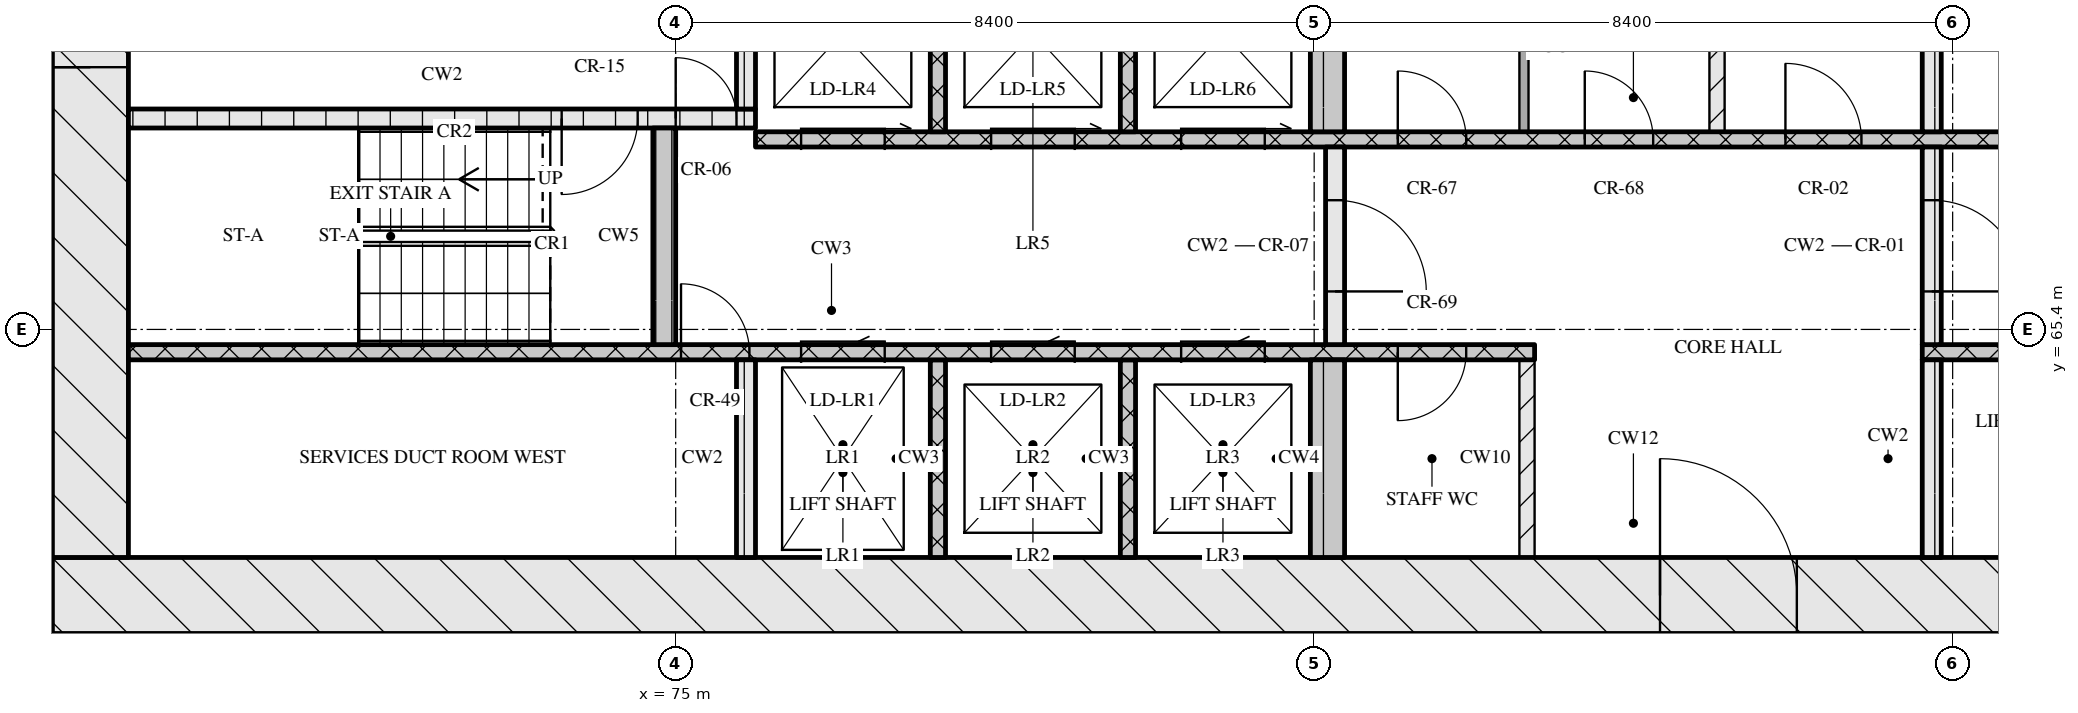
"""IFC4 building model, lengths in metres.
Left out: names, types, materials, properties, quantities, classifications, styles, units other than length and angle.
Written with IfcOpenShell. Run it as: python <this file> out.ifc"""

import sys

from ifc_helpers import new_model, si_unit, direction, frame, frame_2d, origin, place, context, subcontext, project, spatial, rectangle, extrude, element, fill, save


model = new_model("IFC4")
c1 = context("Model", 3, precision=1e-05, world=origin(), true_north=direction((0.0, 1.0)))
c2 = subcontext(c1, "Body", "Model", "MODEL_VIEW")
j1 = project(units=[si_unit("LENGTHUNIT", "METRE"), si_unit("PLANEANGLEUNIT", "RADIAN")], contexts=[c1])
p1 = place(None, origin())
s1 = spatial("IfcSite", under=j1, at=p1, CompositionType="ELEMENT")
p2 = place(p1, origin())
s2 = spatial("IfcBuilding", under=s1, at=p2, CompositionType="ELEMENT")
p3 = place(p2, frame((0.0, 0.0, 120.45)))
s3 = spatial("IfcBuildingStorey", under=s2, at=p3, CompositionType="ELEMENT", Elevation=120.45)
p4 = place(p3, frame((66.8, 61.9, 0.0), z_axis=(0.0, 0.0, 1.0), x_axis=(1.0, 0.0, 0.0)))
e1 = element("IfcWall", 1, at=p4, inside=s3, PredefinedType="SOLIDWALL", context=c2, shape_type="SweptSolid", body=[
    extrude(rectangle(XDim=41.6, YDim=1.0, at=frame_2d((20.8, 0.0))), origin(), (0.0, 0.0, 1.0), 3.32),
])
p5 = place(p4, frame((21.15, 0.0, 0.0)))
e2 = element("IfcOpeningElement", 2, at=p5, cuts=e1, PredefinedType="OPENING", context=c2, shape_type="SweptSolid", body=[
    extrude(rectangle(XDim=1.8, YDim=2.1, at=frame_2d((0.9, 1.05))), frame((0.0, 0.51, 0.0), z_axis=(0.0, -1.0, 0.0), x_axis=(1.0, 0.0, 0.0)), (0.0, 0.0, 1.0), 1.02),
])
p6 = place(p3, frame((67.3, 62.4, 0.0), z_axis=(0.0, 0.0, 1.0), x_axis=(0.0, 1.0, 0.0)))
e3 = element("IfcWall", 3, at=p6, inside=s3, PredefinedType="SOLIDWALL", context=c2, shape_type="SweptSolid", body=[
    extrude(rectangle(XDim=12.0, YDim=1.0, at=frame_2d((6.0, 0.0))), origin(), (0.0, 0.0, 1.0), 3.32),
])
p7 = place(p6, frame((6.45, 0.0, 0.0)))
e4 = element("IfcOpeningElement", 4, at=p7, cuts=e3, PredefinedType="OPENING", context=c2, shape_type="SweptSolid", body=[
    extrude(rectangle(XDim=1.2, YDim=2.1, at=frame_2d((0.6, 1.05))), frame((0.0, 0.51, 0.0), z_axis=(0.0, -1.0, 0.0), x_axis=(1.0, 0.0, 0.0)), (0.0, 0.0, 1.0), 1.02),
])
p8 = place(p3, frame((75.925, 62.4, 0.0), z_axis=(0.0, 0.0, 1.0), x_axis=(0.0, 1.0, 0.0)))
e5 = element("IfcWall", 5, at=p8, inside=s3, PredefinedType="SOLIDWALL", context=c2, shape_type="SweptSolid", body=[
    extrude(rectangle(XDim=2.6, YDim=0.25, at=frame_2d((1.3, 0.0))), origin(), (0.0, 0.0, 1.0), 3.32),
])
for number, where, z_axis, x_axis in (
    (6, (78.45, 62.4, 0.0), (0.0, 0.0, 1.0), (0.0, 1.0, 0.0)),
    (7, (80.95, 62.4, 0.0), (0.0, 0.0, 1.0), (0.0, 1.0, 0.0)),
):
    element("IfcWall", number, at=place(p3, frame(where, z_axis=z_axis, x_axis=x_axis)), inside=s3, PredefinedType="SOLIDWALL", context=c2, shape_type="SweptSolid", body=[
        extrude(rectangle(XDim=2.6, YDim=0.2, at=frame_2d((1.3, 0.0))), origin(), (0.0, 0.0, 1.0), 3.32),
    ])
p9 = place(p3, frame((83.575, 62.4, 0.0), z_axis=(0.0, 0.0, 1.0), x_axis=(0.0, 1.0, 0.0)))
e8 = element("IfcWall", 8, at=p9, inside=s3, PredefinedType="SOLIDWALL", context=c2, shape_type="SweptSolid", body=[
    extrude(rectangle(XDim=2.6, YDim=0.45, at=frame_2d((1.3, 0.0))), origin(), (0.0, 0.0, 1.0), 3.32),
])
p10 = place(p3, frame((86.2, 62.4, 0.0), z_axis=(0.0, 0.0, 1.0), x_axis=(0.0, 1.0, 0.0)))
e9 = element("IfcWall", 9, at=p10, inside=s3, PredefinedType="PARTITIONING", context=c2, shape_type="SweptSolid", body=[
    extrude(rectangle(XDim=2.6, YDim=0.2, at=frame_2d((1.3, 0.0))), origin(), (0.0, 0.0, 1.0), 3.32),
])
p11 = place(p3, frame((91.525, 62.4, 0.0), z_axis=(0.0, 0.0, 1.0), x_axis=(0.0, 1.0, 0.0)))
e10 = element("IfcWall", 10, at=p11, inside=s3, PredefinedType="SOLIDWALL", context=c2, shape_type="SweptSolid", body=[
    extrude(rectangle(XDim=2.6, YDim=0.25, at=frame_2d((1.3, 0.0))), origin(), (0.0, 0.0, 1.0), 3.32),
])
p12 = place(p3, frame((67.8, 65.1, 0.0), z_axis=(0.0, 0.0, 1.0), x_axis=(1.0, 0.0, 0.0)))
e11 = element("IfcWall", 11, at=p12, inside=s3, PredefinedType="SOLIDWALL", context=c2, shape_type="SweptSolid", body=[
    extrude(rectangle(XDim=18.5, YDim=0.2, at=frame_2d((9.25, 0.0))), origin(), (0.0, 0.0, 1.0), 3.32),
])
p13 = place(p12, frame((7.27, 0.0, 0.0)))
e12 = element("IfcOpeningElement", 12, at=p13, cuts=e11, PredefinedType="OPENING", context=c2, shape_type="SweptSolid", body=[
    extrude(rectangle(XDim=0.9, YDim=2.1, at=frame_2d((0.45, 1.05))), frame((0.0, 0.11, 0.0), z_axis=(0.0, -1.0, 0.0), x_axis=(1.0, 0.0, 0.0)), (0.0, 0.0, 1.0), 0.22),
])
p14 = place(p12, frame((8.85, 0.0, 0.0)))
e13 = element("IfcOpeningElement", 13, at=p14, cuts=e11, PredefinedType="OPENING", context=c2, shape_type="SweptSolid", body=[
    extrude(rectangle(XDim=1.1, YDim=2.1, at=frame_2d((0.55, 1.05))), frame((0.0, 0.11, 0.0), z_axis=(0.0, -1.0, 0.0), x_axis=(1.0, 0.0, 0.0)), (0.0, 0.0, 1.0), 0.22),
])
p15 = place(p12, frame((11.35, 0.0, 0.0)))
e14 = element("IfcOpeningElement", 14, at=p15, cuts=e11, PredefinedType="OPENING", context=c2, shape_type="SweptSolid", body=[
    extrude(rectangle(XDim=1.1, YDim=2.1, at=frame_2d((0.55, 1.05))), frame((0.0, 0.11, 0.0), z_axis=(0.0, -1.0, 0.0), x_axis=(1.0, 0.0, 0.0)), (0.0, 0.0, 1.0), 0.22),
])
p16 = place(p12, frame((13.85, 0.0, 0.0)))
e15 = element("IfcOpeningElement", 15, at=p16, cuts=e11, PredefinedType="OPENING", context=c2, shape_type="SweptSolid", body=[
    extrude(rectangle(XDim=1.1, YDim=2.1, at=frame_2d((0.55, 1.05))), frame((0.0, 0.11, 0.0), z_axis=(0.0, -1.0, 0.0), x_axis=(1.0, 0.0, 0.0)), (0.0, 0.0, 1.0), 0.22),
])
p17 = place(p12, frame((16.7, 0.0, 0.0)))
e16 = element("IfcOpeningElement", 16, at=p17, cuts=e11, PredefinedType="OPENING", context=c2, shape_type="SweptSolid", body=[
    extrude(rectangle(XDim=0.9, YDim=2.1, at=frame_2d((0.45, 1.05))), frame((0.0, 0.11, 0.0), z_axis=(0.0, -1.0, 0.0), x_axis=(1.0, 0.0, 0.0)), (0.0, 0.0, 1.0), 0.22),
])
p18 = place(p3, frame((91.4, 65.1, 0.0), z_axis=(0.0, 0.0, 1.0), x_axis=(1.0, 0.0, 0.0)))
e17 = element("IfcWall", 17, at=p18, inside=s3, PredefinedType="SOLIDWALL", context=c2, shape_type="SweptSolid", body=[
    extrude(rectangle(XDim=16.0, YDim=0.2, at=frame_2d((8.0, 0.0))), origin(), (0.0, 0.0, 1.0), 3.32),
])
p19 = place(p18, frame((7.83, 0.0, 0.0)))
e18 = element("IfcOpeningElement", 18, at=p19, cuts=e17, PredefinedType="OPENING", context=c2, shape_type="SweptSolid", body=[
    extrude(rectangle(XDim=0.9, YDim=2.1, at=frame_2d((0.45, 1.05))), frame((0.0, 0.11, 0.0), z_axis=(0.0, -1.0, 0.0), x_axis=(1.0, 0.0, 0.0)), (0.0, 0.0, 1.0), 0.22),
])
p20 = place(p3, frame((74.85, 65.2, 0.0), z_axis=(0.0, 0.0, 1.0), x_axis=(0.0, 1.0, 0.0)))
e19 = element("IfcWall", 19, at=p20, inside=s3, PredefinedType="SOLIDWALL", context=c2, shape_type="SweptSolid", body=[
    extrude(rectangle(XDim=2.85, YDim=0.3, at=frame_2d((1.425, 0.0))), origin(), (0.0, 0.0, 1.0), 3.32),
])
p21 = place(p3, frame((83.675, 65.2, 0.0), z_axis=(0.0, 0.0, 1.0), x_axis=(0.0, 1.0, 0.0)))
e20 = element("IfcWall", 20, at=p21, inside=s3, PredefinedType="SOLIDWALL", context=c2, shape_type="SweptSolid", body=[
    extrude(rectangle(XDim=2.6, YDim=0.25, at=frame_2d((1.3, 0.0))), origin(), (0.0, 0.0, 1.0), 3.32),
])
p22 = place(p21, frame((0.7, 0.0, 0.0)))
e21 = element("IfcOpeningElement", 21, at=p22, cuts=e20, PredefinedType="OPENING", context=c2, shape_type="SweptSolid", body=[
    extrude(rectangle(XDim=1.2, YDim=2.1, at=frame_2d((0.6, 1.05))), frame((0.0, 0.135, 0.0), z_axis=(0.0, -1.0, 0.0), x_axis=(1.0, 0.0, 0.0)), (0.0, 0.0, 1.0), 0.27),
])
p23 = place(p3, frame((91.525, 65.2, 0.0), z_axis=(0.0, 0.0, 1.0), x_axis=(0.0, 1.0, 0.0)))
e22 = element("IfcWall", 22, at=p23, inside=s3, PredefinedType="SOLIDWALL", context=c2, shape_type="SweptSolid", body=[
    extrude(rectangle(XDim=2.6, YDim=0.25, at=frame_2d((1.3, 0.0))), origin(), (0.0, 0.0, 1.0), 3.32),
])
p24 = place(p23, frame((0.7, 0.0, 0.0)))
e23 = element("IfcOpeningElement", 23, at=p24, cuts=e22, PredefinedType="OPENING", context=c2, shape_type="SweptSolid", body=[
    extrude(rectangle(XDim=1.2, YDim=2.1, at=frame_2d((0.6, 1.05))), frame((0.0, 0.135, 0.0), z_axis=(0.0, -1.0, 0.0), x_axis=(1.0, 0.0, 0.0)), (0.0, 0.0, 1.0), 0.27),
])
p25 = place(p3, frame((76.05, 67.9, 0.0), z_axis=(0.0, 0.0, 1.0), x_axis=(1.0, 0.0, 0.0)))
e24 = element("IfcWall", 24, at=p25, inside=s3, PredefinedType="SOLIDWALL", context=c2, shape_type="SweptSolid", body=[
    extrude(rectangle(XDim=23.1, YDim=0.2, at=frame_2d((11.55, 0.0))), origin(), (0.0, 0.0, 1.0), 3.32),
])
p26 = place(p25, frame((0.6, 0.0, 0.0)))
e25 = element("IfcOpeningElement", 25, at=p26, cuts=e24, PredefinedType="OPENING", context=c2, shape_type="SweptSolid", body=[
    extrude(rectangle(XDim=1.1, YDim=2.1, at=frame_2d((0.55, 1.05))), frame((0.0, 0.11, 0.0), z_axis=(0.0, -1.0, 0.0), x_axis=(1.0, 0.0, 0.0)), (0.0, 0.0, 1.0), 0.22),
])
p27 = place(p25, frame((3.1, 0.0, 0.0)))
e26 = element("IfcOpeningElement", 26, at=p27, cuts=e24, PredefinedType="OPENING", context=c2, shape_type="SweptSolid", body=[
    extrude(rectangle(XDim=1.1, YDim=2.1, at=frame_2d((0.55, 1.05))), frame((0.0, 0.11, 0.0), z_axis=(0.0, -1.0, 0.0), x_axis=(1.0, 0.0, 0.0)), (0.0, 0.0, 1.0), 0.22),
])
p28 = place(p25, frame((5.6, 0.0, 0.0)))
e27 = element("IfcOpeningElement", 27, at=p28, cuts=e24, PredefinedType="OPENING", context=c2, shape_type="SweptSolid", body=[
    extrude(rectangle(XDim=1.1, YDim=2.1, at=frame_2d((0.55, 1.05))), frame((0.0, 0.11, 0.0), z_axis=(0.0, -1.0, 0.0), x_axis=(1.0, 0.0, 0.0)), (0.0, 0.0, 1.0), 0.22),
])
p29 = place(p25, frame((8.45, 0.0, 0.0)))
e28 = element("IfcOpeningElement", 28, at=p29, cuts=e24, PredefinedType="OPENING", context=c2, shape_type="SweptSolid", body=[
    extrude(rectangle(XDim=0.9, YDim=2.1, at=frame_2d((0.45, 1.05))), frame((0.0, 0.11, 0.0), z_axis=(0.0, -1.0, 0.0), x_axis=(1.0, 0.0, 0.0)), (0.0, 0.0, 1.0), 0.22),
])
p30 = place(p25, frame((10.91, 0.0, 0.0)))
e29 = element("IfcOpeningElement", 29, at=p30, cuts=e24, PredefinedType="OPENING", context=c2, shape_type="SweptSolid", body=[
    extrude(rectangle(XDim=0.9, YDim=2.1, at=frame_2d((0.45, 1.05))), frame((0.0, 0.11, 0.0), z_axis=(0.0, -1.0, 0.0), x_axis=(1.0, 0.0, 0.0)), (0.0, 0.0, 1.0), 0.22),
])
p31 = place(p25, frame((13.55, 0.0, 0.0)))
e30 = element("IfcOpeningElement", 30, at=p31, cuts=e24, PredefinedType="OPENING", context=c2, shape_type="SweptSolid", body=[
    extrude(rectangle(XDim=1.0, YDim=2.1, at=frame_2d((0.5, 1.05))), frame((0.0, 0.11, 0.0), z_axis=(0.0, -1.0, 0.0), x_axis=(1.0, 0.0, 0.0)), (0.0, 0.0, 1.0), 0.22),
])
for number, where, z_axis, x_axis in (
    (31, (78.45, 68.0, 0.0), (0.0, 0.0, 1.0), (0.0, 1.0, 0.0)),
    (32, (80.95, 68.0, 0.0), (0.0, 0.0, 1.0), (0.0, 1.0, 0.0)),
):
    element("IfcWall", number, at=place(p3, frame(where, z_axis=z_axis, x_axis=x_axis)), inside=s3, PredefinedType="SOLIDWALL", context=c2, shape_type="SweptSolid", body=[
        extrude(rectangle(XDim=2.6, YDim=0.2, at=frame_2d((1.3, 0.0))), origin(), (0.0, 0.0, 1.0), 3.32),
    ])
p32 = place(p3, frame((83.575, 68.0, 0.0), z_axis=(0.0, 0.0, 1.0), x_axis=(0.0, 1.0, 0.0)))
e33 = element("IfcWall", 33, at=p32, inside=s3, PredefinedType="SOLIDWALL", context=c2, shape_type="SweptSolid", body=[
    extrude(rectangle(XDim=2.6, YDim=0.45, at=frame_2d((1.3, 0.0))), origin(), (0.0, 0.0, 1.0), 3.32),
])
p33 = place(p3, frame((86.16, 68.0, 0.0), z_axis=(0.0, 0.0, 1.0), x_axis=(0.0, 1.0, 0.0)))
e34 = element("IfcWall", 34, at=p33, inside=s3, PredefinedType="PARTITIONING", context=c2, shape_type="SweptSolid", body=[
    extrude(rectangle(XDim=2.6, YDim=0.12, at=frame_2d((1.3, 0.0))), origin(), (0.0, 0.0, 1.0), 3.32),
])
p34 = place(p3, frame((88.7, 68.0, 0.0), z_axis=(0.0, 0.0, 1.0), x_axis=(0.0, 1.0, 0.0)))
e35 = element("IfcWall", 35, at=p34, inside=s3, PredefinedType="PARTITIONING", context=c2, shape_type="SweptSolid", body=[
    extrude(rectangle(XDim=2.6, YDim=0.2, at=frame_2d((1.3, 0.0))), origin(), (0.0, 0.0, 1.0), 3.32),
])
p35 = place(p3, frame((91.525, 68.0, 0.0), z_axis=(0.0, 0.0, 1.0), x_axis=(0.0, 1.0, 0.0)))
e36 = element("IfcWall", 36, at=p35, inside=s3, PredefinedType="SOLIDWALL", context=c2, shape_type="SweptSolid", body=[
    extrude(rectangle(XDim=2.6, YDim=0.25, at=frame_2d((1.3, 0.0))), origin(), (0.0, 0.0, 1.0), 3.32),
])
p36 = place(p3, frame((67.8, 68.175, 0.0), z_axis=(0.0, 0.0, 1.0), x_axis=(1.0, 0.0, 0.0)))
e37 = element("IfcWall", 37, at=p36, inside=s3, PredefinedType="SOLIDWALL", context=c2, shape_type="SweptSolid", body=[
    extrude(rectangle(XDim=8.25, YDim=0.25, at=frame_2d((4.125, 0.0))), origin(), (0.0, 0.0, 1.0), 3.32),
])
p37 = place(p36, frame((5.7, 0.0, 0.0)))
e38 = element("IfcOpeningElement", 38, at=p37, cuts=e37, PredefinedType="OPENING", context=c2, shape_type="SweptSolid", body=[
    extrude(rectangle(XDim=1.0, YDim=2.1, at=frame_2d((0.5, 1.05))), frame((0.0, 0.135, 0.0), z_axis=(0.0, -1.0, 0.0), x_axis=(1.0, 0.0, 0.0)), (0.0, 0.0, 1.0), 0.27),
])
p38 = place(p36, frame((7.2, 0.0, 0.0)))
e39 = element("IfcOpeningElement", 39, at=p38, cuts=e37, PredefinedType="OPENING", context=c2, shape_type="SweptSolid", body=[
    extrude(rectangle(XDim=0.8, YDim=2.1, at=frame_2d((0.4, 1.05))), frame((0.0, 0.135, 0.0), z_axis=(0.0, -1.0, 0.0), x_axis=(1.0, 0.0, 0.0)), (0.0, 0.0, 1.0), 0.27),
])
p39 = place(p3, frame((75.925, 68.3, 0.0), z_axis=(0.0, 0.0, 1.0), x_axis=(0.0, 1.0, 0.0)))
e40 = element("IfcWall", 40, at=p39, inside=s3, PredefinedType="SOLIDWALL", context=c2, shape_type="SweptSolid", body=[
    extrude(rectangle(XDim=2.3, YDim=0.25, at=frame_2d((1.15, 0.0))), origin(), (0.0, 0.0, 1.0), 3.32),
])
p40 = place(p5, origin())
e41 = element("IfcDoor", 41, at=p40, inside=s3, OperationType="DOUBLE_DOOR_SINGLE_SWING", PredefinedType="DOOR", context=c2, shape_type="SweptSolid", body=[
    extrude(rectangle(XDim=1.8, YDim=2.1, at=frame_2d((0.9, 1.05))), frame((0.0, 0.025, 0.0), z_axis=(0.0, -1.0, 0.0), x_axis=(1.0, 0.0, 0.0)), (0.0, 0.0, 1.0), 0.05),
])
fill(e2, e41)
p41 = place(p13, origin())
e42 = element("IfcDoor", 42, at=p41, inside=s3, OperationType="SINGLE_SWING_LEFT", PredefinedType="DOOR", context=c2, shape_type="SweptSolid", body=[
    extrude(rectangle(XDim=0.9, YDim=2.1, at=frame_2d((0.45, 1.05))), frame((0.0, 0.025, 0.0), z_axis=(0.0, -1.0, 0.0), x_axis=(1.0, 0.0, 0.0)), (0.0, 0.0, 1.0), 0.05),
])
fill(e12, e42)
p42 = place(p14, origin())
e43 = element("IfcDoor", 43, at=p42, inside=s3, OperationType="SLIDING_TO_LEFT", PredefinedType="DOOR", context=c2, shape_type="SweptSolid", body=[
    extrude(rectangle(XDim=1.1, YDim=2.1, at=frame_2d((0.55, 1.05))), frame((0.0, 0.025, 0.0), z_axis=(0.0, -1.0, 0.0), x_axis=(1.0, 0.0, 0.0)), (0.0, 0.0, 1.0), 0.05),
])
fill(e13, e43)
p43 = place(p15, origin())
e44 = element("IfcDoor", 44, at=p43, inside=s3, OperationType="SLIDING_TO_LEFT", PredefinedType="DOOR", context=c2, shape_type="SweptSolid", body=[
    extrude(rectangle(XDim=1.1, YDim=2.1, at=frame_2d((0.55, 1.05))), frame((0.0, 0.025, 0.0), z_axis=(0.0, -1.0, 0.0), x_axis=(1.0, 0.0, 0.0)), (0.0, 0.0, 1.0), 0.05),
])
fill(e14, e44)
p44 = place(p16, origin())
e45 = element("IfcDoor", 45, at=p44, inside=s3, OperationType="SLIDING_TO_LEFT", PredefinedType="DOOR", context=c2, shape_type="SweptSolid", body=[
    extrude(rectangle(XDim=1.1, YDim=2.1, at=frame_2d((0.55, 1.05))), frame((0.0, 0.025, 0.0), z_axis=(0.0, -1.0, 0.0), x_axis=(1.0, 0.0, 0.0)), (0.0, 0.0, 1.0), 0.05),
])
fill(e15, e45)
p45 = place(p17, origin())
e46 = element("IfcDoor", 46, at=p45, inside=s3, OperationType="SINGLE_SWING_RIGHT", PredefinedType="DOOR", context=c2, shape_type="SweptSolid", body=[
    extrude(rectangle(XDim=0.9, YDim=2.1, at=frame_2d((0.45, 1.05))), frame((0.0, 0.025, 0.0), z_axis=(0.0, -1.0, 0.0), x_axis=(1.0, 0.0, 0.0)), (0.0, 0.0, 1.0), 0.05),
])
fill(e16, e46)
p46 = place(p22, origin())
e47 = element("IfcDoor", 47, at=p46, inside=s3, OperationType="SINGLE_SWING_RIGHT", PredefinedType="DOOR", context=c2, shape_type="SweptSolid", body=[
    extrude(rectangle(XDim=1.2, YDim=2.1, at=frame_2d((0.6, 1.05))), frame((0.0, 0.025, 0.0), z_axis=(0.0, -1.0, 0.0), x_axis=(1.0, 0.0, 0.0)), (0.0, 0.0, 1.0), 0.05),
])
fill(e21, e47)
p47 = place(p24, origin())
e48 = element("IfcDoor", 48, at=p47, inside=s3, OperationType="SINGLE_SWING_RIGHT", PredefinedType="DOOR", context=c2, shape_type="SweptSolid", body=[
    extrude(rectangle(XDim=1.2, YDim=2.1, at=frame_2d((0.6, 1.05))), frame((0.0, 0.025, 0.0), z_axis=(0.0, -1.0, 0.0), x_axis=(1.0, 0.0, 0.0)), (0.0, 0.0, 1.0), 0.05),
])
fill(e23, e48)
p48 = place(p26, origin())
e49 = element("IfcDoor", 49, at=p48, inside=s3, OperationType="SLIDING_TO_RIGHT", PredefinedType="DOOR", context=c2, shape_type="SweptSolid", body=[
    extrude(rectangle(XDim=1.1, YDim=2.1, at=frame_2d((0.55, 1.05))), frame((0.0, 0.025, 0.0), z_axis=(0.0, -1.0, 0.0), x_axis=(1.0, 0.0, 0.0)), (0.0, 0.0, 1.0), 0.05),
])
fill(e25, e49)
p49 = place(p27, origin())
e50 = element("IfcDoor", 50, at=p49, inside=s3, OperationType="SLIDING_TO_RIGHT", PredefinedType="DOOR", context=c2, shape_type="SweptSolid", body=[
    extrude(rectangle(XDim=1.1, YDim=2.1, at=frame_2d((0.55, 1.05))), frame((0.0, 0.025, 0.0), z_axis=(0.0, -1.0, 0.0), x_axis=(1.0, 0.0, 0.0)), (0.0, 0.0, 1.0), 0.05),
])
fill(e26, e50)
p50 = place(p28, origin())
e51 = element("IfcDoor", 51, at=p50, inside=s3, OperationType="SLIDING_TO_RIGHT", PredefinedType="DOOR", context=c2, shape_type="SweptSolid", body=[
    extrude(rectangle(XDim=1.1, YDim=2.1, at=frame_2d((0.55, 1.05))), frame((0.0, 0.025, 0.0), z_axis=(0.0, -1.0, 0.0), x_axis=(1.0, 0.0, 0.0)), (0.0, 0.0, 1.0), 0.05),
])
fill(e27, e51)
p51 = place(p29, origin())
e52 = element("IfcDoor", 52, at=p51, inside=s3, OperationType="SINGLE_SWING_LEFT", PredefinedType="DOOR", context=c2, shape_type="SweptSolid", body=[
    extrude(rectangle(XDim=0.9, YDim=2.1, at=frame_2d((0.45, 1.05))), frame((0.0, 0.025, 0.0), z_axis=(0.0, -1.0, 0.0), x_axis=(1.0, 0.0, 0.0)), (0.0, 0.0, 1.0), 0.05),
])
fill(e28, e52)
p52 = place(p30, origin())
e53 = element("IfcDoor", 53, at=p52, inside=s3, OperationType="SINGLE_SWING_LEFT", PredefinedType="DOOR", context=c2, shape_type="SweptSolid", body=[
    extrude(rectangle(XDim=0.9, YDim=2.1, at=frame_2d((0.45, 1.05))), frame((0.0, 0.025, 0.0), z_axis=(0.0, -1.0, 0.0), x_axis=(1.0, 0.0, 0.0)), (0.0, 0.0, 1.0), 0.05),
])
fill(e29, e53)
p53 = place(p31, origin())
e54 = element("IfcDoor", 54, at=p53, inside=s3, OperationType="SINGLE_SWING_LEFT", PredefinedType="DOOR", context=c2, shape_type="SweptSolid", body=[
    extrude(rectangle(XDim=1.0, YDim=2.1, at=frame_2d((0.5, 1.05))), frame((0.0, 0.025, 0.0), z_axis=(0.0, -1.0, 0.0), x_axis=(1.0, 0.0, 0.0)), (0.0, 0.0, 1.0), 0.05),
])
fill(e30, e54)
p54 = place(p37, origin())
e55 = element("IfcDoor", 55, at=p54, inside=s3, OperationType="SINGLE_SWING_RIGHT", PredefinedType="DOOR", context=c2, shape_type="SweptSolid", body=[
    extrude(rectangle(XDim=1.0, YDim=2.1, at=frame_2d((0.5, 1.05))), frame((0.0, 0.025, 0.0), z_axis=(0.0, -1.0, 0.0), x_axis=(1.0, 0.0, 0.0)), (0.0, 0.0, 1.0), 0.05),
])
fill(e38, e55)
p55 = place(p38, origin())
e56 = element("IfcDoor", 56, at=p55, inside=s3, OperationType="SINGLE_SWING_LEFT", PredefinedType="DOOR", context=c2, shape_type="SweptSolid", body=[
    extrude(rectangle(XDim=0.8, YDim=2.1, at=frame_2d((0.4, 1.05))), frame((0.0, 0.025, 0.0), z_axis=(0.0, -1.0, 0.0), x_axis=(1.0, 0.0, 0.0)), (0.0, 0.0, 1.0), 0.05),
])
fill(e39, e56)
p56 = place(p7, origin())
e57 = element("IfcDoor", 57, at=p56, inside=s3, OperationType="SINGLE_SWING_LEFT", PredefinedType="DOOR", context=c2, shape_type="SweptSolid", body=[
    extrude(rectangle(XDim=1.2, YDim=2.1, at=frame_2d((0.6, 1.05))), frame((0.0, 0.025, 0.0), z_axis=(0.0, -1.0, 0.0), x_axis=(1.0, 0.0, 0.0)), (0.0, 0.0, 1.0), 0.05),
])
fill(e4, e57)
save(model, sys.argv[1])
